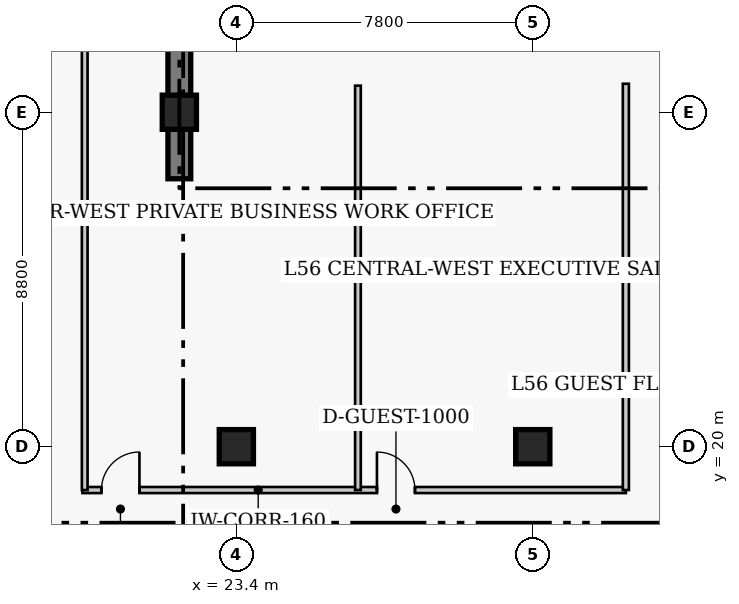
"""IFC4 building model, lengths in metres.
Left out: names, types, materials, properties, quantities, classifications, styles, units other than length and angle.
Written with IfcOpenShell. Run it as: python <this file> out.ifc"""

import sys

from ifc_helpers import new_model, si_unit, direction, frame, frame_2d, origin, origin_2d, place, context, subcontext, project, spatial, rectangle, extrude, element, fill, save


model = new_model("IFC4")
c1 = context("Model", 3, precision=1e-05, world=origin(), true_north=direction((0.0, 1.0)))
c2 = subcontext(c1, "Body", "Model", "MODEL_VIEW")
j1 = project(units=[si_unit("LENGTHUNIT", "METRE"), si_unit("PLANEANGLEUNIT", "RADIAN")], contexts=[c1])
p1 = place(None, origin())
s1 = spatial("IfcSite", under=j1, at=p1, CompositionType="ELEMENT")
p2 = place(p1, origin())
s2 = spatial("IfcBuilding", under=s1, at=p2, CompositionType="ELEMENT")
p3 = place(p2, frame((0.0, 0.0, 224.1)))
s3 = spatial("IfcBuildingStorey", under=s2, at=p3, CompositionType="ELEMENT", Elevation=224.1)
p4 = place(p3, frame((21.9, 27.05, 0.0), z_axis=(0.0, 0.0, 1.0), x_axis=(0.0, 1.0, 0.0)))
e1 = element("IfcWall", 1, at=p4, inside=s3, PredefinedType="SHEAR", context=c2, shape_type="SweptSolid", body=[
    extrude(rectangle(XDim=13.57, YDim=0.6, at=frame_2d((6.785, 0.0))), origin(), (0.0, 0.0, 1.0), 3.9),
])
for number, where, z_axis, x_axis in (
    (2, (23.4, 20.0, 0.0), (0.0, 0.0, 1.0), (1.0, 0.0, 0.0)),
    (3, (31.2, 20.0, 0.0), (0.0, 0.0, 1.0), (1.0, 0.0, 0.0)),
    (4, (21.9, 28.8, 0.0), (0.0, 0.0, 1.0), (1.0, 0.0, 0.0)),
):
    element("IfcColumn", number, at=place(p3, frame(where, z_axis=z_axis, x_axis=x_axis)), inside=s3, PredefinedType="COLUMN", context=c2, shape_type="SweptSolid", body=[
        extrude(rectangle(XDim=0.9, YDim=0.9, at=origin_2d()), origin(), (0.0, 0.0, 1.0), 3.9),
    ])
p5 = place(p3, frame((19.35, 18.86, 0.0), z_axis=(0.0, 0.0, 1.0), x_axis=(1.0, 0.0, 0.0)))
e5 = element("IfcWall", 5, at=p5, inside=s3, PredefinedType="PARTITIONING", context=c2, shape_type="SweptSolid", body=[
    extrude(rectangle(XDim=14.3, YDim=0.16, at=frame_2d((7.15, 0.0))), origin(), (0.0, 0.0, 1.0), 3.65),
])
p6 = place(p5, frame((0.5, 0.0, 0.0)))
e6 = element("IfcOpeningElement", 6, at=p6, cuts=e5, PredefinedType="OPENING", context=c2, shape_type="SweptSolid", body=[
    extrude(rectangle(XDim=1.0, YDim=2.15, at=frame_2d((0.5, 1.075))), frame((0.0, 0.09, 0.0), z_axis=(0.0, -1.0, 0.0), x_axis=(1.0, 0.0, 0.0)), (0.0, 0.0, 1.0), 0.18),
])
p7 = place(p5, frame((7.75, 0.0, 0.0)))
e7 = element("IfcOpeningElement", 7, at=p7, cuts=e5, PredefinedType="OPENING", context=c2, shape_type="SweptSolid", body=[
    extrude(rectangle(XDim=1.0, YDim=2.15, at=frame_2d((0.5, 1.075))), frame((0.0, 0.09, 0.0), z_axis=(0.0, -1.0, 0.0), x_axis=(1.0, 0.0, 0.0)), (0.0, 0.0, 1.0), 0.18),
])
p8 = place(p3, frame((33.65, 18.86, 0.0), z_axis=(0.0, 0.0, 1.0), x_axis=(0.0, 1.0, 0.0)))
e8 = element("IfcWall", 8, at=p8, inside=s3, PredefinedType="PARTITIONING", context=c2, shape_type="SweptSolid", body=[
    extrude(rectangle(XDim=10.69, YDim=0.16, at=frame_2d((5.345, 0.0))), origin(), (0.0, 0.0, 1.0), 3.65),
])
p9 = place(p3, frame((19.41, 18.86, 0.0), z_axis=(0.0, 0.0, 1.0), x_axis=(0.0, 1.0, 0.0)))
e9 = element("IfcWall", 9, at=p9, inside=s3, PredefinedType="PARTITIONING", context=c2, shape_type="SweptSolid", body=[
    extrude(rectangle(XDim=13.94, YDim=0.15, at=frame_2d((6.97, 0.0))), origin(), (0.0, 0.0, 1.0), 3.246),
])
p10 = place(p3, frame((26.6, 18.86, 0.0), z_axis=(0.0, 0.0, 1.0), x_axis=(0.0, 1.0, 0.0)))
e10 = element("IfcWall", 10, at=p10, inside=s3, PredefinedType="PARTITIONING", context=c2, shape_type="SweptSolid", body=[
    extrude(rectangle(XDim=10.64, YDim=0.15, at=frame_2d((5.32, 0.0))), origin(), (0.0, 0.0, 1.0), 3.65),
])
p11 = place(p6, origin())
e11 = element("IfcDoor", 11, at=p11, inside=s3, OperationType="SINGLE_SWING_RIGHT", PredefinedType="DOOR", context=c2, shape_type="SweptSolid", body=[
    extrude(rectangle(XDim=1.0, YDim=2.15, at=frame_2d((0.5, 1.075))), frame((0.0, 0.025, 0.0), z_axis=(0.0, -1.0, 0.0), x_axis=(1.0, 0.0, 0.0)), (0.0, 0.0, 1.0), 0.05),
])
fill(e6, e11)
p12 = place(p7, origin())
e12 = element("IfcDoor", 12, at=p12, inside=s3, OperationType="SINGLE_SWING_LEFT", PredefinedType="DOOR", context=c2, shape_type="SweptSolid", body=[
    extrude(rectangle(XDim=1.0, YDim=2.15, at=frame_2d((0.5, 1.075))), frame((0.0, 0.025, 0.0), z_axis=(0.0, -1.0, 0.0), x_axis=(1.0, 0.0, 0.0)), (0.0, 0.0, 1.0), 0.05),
])
fill(e7, e12)
save(model, sys.argv[1])
